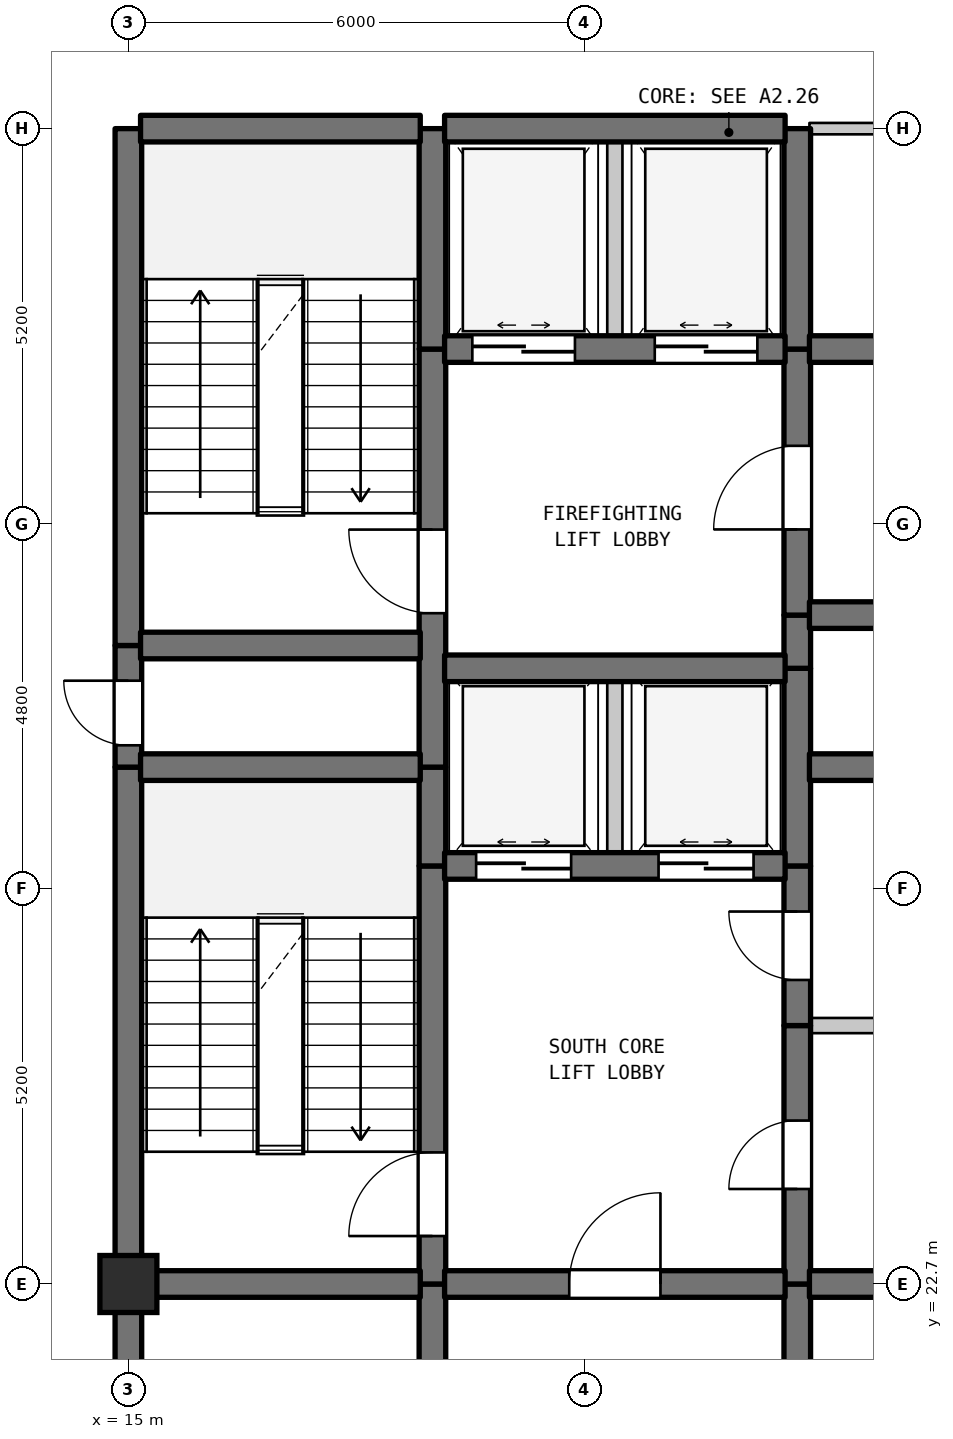
"""IFC4 building model, lengths in metres.
Left out: names, types, materials, properties, quantities, classifications, styles, units other than length and angle.
Written with IfcOpenShell. Run it as: python <this file> out.ifc"""

import sys

from ifc_helpers import new_model, si_unit, direction, frame, frame_2d, origin, origin_2d, place, context, subcontext, project, spatial, rectangle, extrude, element, fill, save


model = new_model("IFC4")
c1 = context("Model", 3, precision=1e-05, world=origin(), true_north=direction((0.0, 1.0)))
c2 = subcontext(c1, "Body", "Model", "MODEL_VIEW")
j1 = project(units=[si_unit("LENGTHUNIT", "METRE"), si_unit("PLANEANGLEUNIT", "RADIAN")], contexts=[c1])
p1 = place(None, origin())
s1 = spatial("IfcSite", under=j1, at=p1, CompositionType="ELEMENT")
p2 = place(p1, origin())
s2 = spatial("IfcBuilding", under=s1, at=p2, CompositionType="ELEMENT")
p3 = place(p2, frame((0.0, 0.0, 242.8)))
s3 = spatial("IfcBuildingStorey", under=s2, at=p3, CompositionType="ELEMENT", Elevation=242.8)
p4 = place(p3, frame((15.0, 22.7, 0.0), z_axis=(0.0, 0.0, 1.0), x_axis=(1.0, 0.0, 0.0)))
e1 = element("IfcColumn", 1, at=p4, inside=s3, PredefinedType="COLUMN", context=c2, shape_type="SweptSolid", body=[
    extrude(rectangle(XDim=0.75, YDim=0.75, at=origin_2d()), origin(), (0.0, 0.0, 1.0), 4.5),
])
p5 = place(p3, frame((15.0, 19.5, 0.0), z_axis=(0.0, 0.0, 1.0), x_axis=(0.0, 1.0, 0.0)))
e2 = element("IfcWall", 2, at=p5, inside=s3, PredefinedType="SHEAR", context=c2, shape_type="SweptSolid", body=[
    extrude(rectangle(XDim=3.2, YDim=0.35, at=frame_2d((1.6, 0.0))), origin(), (0.0, 0.0, 1.0), 4.19),
])
p6 = place(p3, frame((15.0, 22.7, 0.0), z_axis=(0.0, 0.0, 1.0), x_axis=(0.0, 1.0, 0.0)))
e3 = element("IfcWall", 3, at=p6, inside=s3, PredefinedType="SHEAR", context=c2, shape_type="SweptSolid", body=[
    extrude(rectangle(XDim=6.8, YDim=0.35, at=frame_2d((3.4, 0.0))), origin(), (0.0, 0.0, 1.0), 4.19),
])
p7 = place(p3, frame((15.0, 29.5, 0.0), z_axis=(0.0, 0.0, 1.0), x_axis=(0.0, 1.0, 0.0)))
e4 = element("IfcWall", 4, at=p7, inside=s3, PredefinedType="SHEAR", context=c2, shape_type="SweptSolid", body=[
    extrude(rectangle(XDim=1.6, YDim=0.35, at=frame_2d((0.8, 0.0))), origin(), (0.0, 0.0, 1.0), 4.19),
])
p8 = place(p7, frame((0.287, 0.0, 0.0)))
e5 = element("IfcOpeningElement", 5, at=p8, cuts=e4, PredefinedType="OPENING", context=c2, shape_type="SweptSolid", body=[
    extrude(rectangle(XDim=0.85, YDim=2.1, at=frame_2d((0.425, 1.05))), frame((0.0, 0.185, 0.0), z_axis=(0.0, -1.0, 0.0), x_axis=(1.0, 0.0, 0.0)), (0.0, 0.0, 1.0), 0.37),
])
p9 = place(p3, frame((15.0, 31.1, 0.0), z_axis=(0.0, 0.0, 1.0), x_axis=(0.0, 1.0, 0.0)))
e6 = element("IfcWall", 6, at=p9, inside=s3, PredefinedType="SHEAR", context=c2, shape_type="SweptSolid", body=[
    extrude(rectangle(XDim=6.8, YDim=0.35, at=frame_2d((3.4, 0.0))), origin(), (0.0, 0.0, 1.0), 4.19),
])
p10 = place(p3, frame((19.0, 19.5, 0.0), z_axis=(0.0, 0.0, 1.0), x_axis=(0.0, 1.0, 0.0)))
e7 = element("IfcWall", 7, at=p10, inside=s3, PredefinedType="SHEAR", context=c2, shape_type="SweptSolid", body=[
    extrude(rectangle(XDim=3.2, YDim=0.35, at=frame_2d((1.6, 0.0))), origin(), (0.0, 0.0, 1.0), 4.19),
])
p11 = place(p3, frame((19.0, 22.7, 0.0), z_axis=(0.0, 0.0, 1.0), x_axis=(0.0, 1.0, 0.0)))
e8 = element("IfcWall", 8, at=p11, inside=s3, PredefinedType="SHEAR", context=c2, shape_type="SweptSolid", body=[
    extrude(rectangle(XDim=5.5, YDim=0.35, at=frame_2d((2.75, 0.0))), origin(), (0.0, 0.0, 1.0), 4.19),
])
p12 = place(p11, frame((0.631, 0.0, 0.0)))
e9 = element("IfcOpeningElement", 9, at=p12, cuts=e8, PredefinedType="OPENING", context=c2, shape_type="SweptSolid", body=[
    extrude(rectangle(XDim=1.1, YDim=2.15, at=frame_2d((0.55, 1.075))), frame((0.0, 0.185, 0.0), z_axis=(0.0, -1.0, 0.0), x_axis=(1.0, 0.0, 0.0)), (0.0, 0.0, 1.0), 0.37),
])
p13 = place(p3, frame((19.0, 28.2, 0.0), z_axis=(0.0, 0.0, 1.0), x_axis=(0.0, 1.0, 0.0)))
e10 = element("IfcWall", 10, at=p13, inside=s3, PredefinedType="SHEAR", context=c2, shape_type="SweptSolid", body=[
    extrude(rectangle(XDim=1.3, YDim=0.35, at=frame_2d((0.65, 0.0))), origin(), (0.0, 0.0, 1.0), 4.19),
])
p14 = place(p3, frame((19.0, 29.5, 0.0), z_axis=(0.0, 0.0, 1.0), x_axis=(0.0, 1.0, 0.0)))
e11 = element("IfcWall", 11, at=p14, inside=s3, PredefinedType="SHEAR", context=c2, shape_type="SweptSolid", body=[
    extrude(rectangle(XDim=5.5, YDim=0.35, at=frame_2d((2.75, 0.0))), origin(), (0.0, 0.0, 1.0), 4.19),
])
p15 = place(p14, frame((2.025, 0.0, 0.0)))
e12 = element("IfcOpeningElement", 12, at=p15, cuts=e11, PredefinedType="OPENING", context=c2, shape_type="SweptSolid", body=[
    extrude(rectangle(XDim=1.1, YDim=2.15, at=frame_2d((0.55, 1.075))), frame((0.0, 0.185, 0.0), z_axis=(0.0, -1.0, 0.0), x_axis=(1.0, 0.0, 0.0)), (0.0, 0.0, 1.0), 0.37),
])
p16 = place(p3, frame((19.0, 35.0, 0.0), z_axis=(0.0, 0.0, 1.0), x_axis=(0.0, 1.0, 0.0)))
e13 = element("IfcWall", 13, at=p16, inside=s3, PredefinedType="SHEAR", context=c2, shape_type="SweptSolid", body=[
    extrude(rectangle(XDim=2.9, YDim=0.35, at=frame_2d((1.45, 0.0))), origin(), (0.0, 0.0, 1.0), 4.19),
])
p17 = place(p3, frame((21.4, 28.2, 0.0), z_axis=(0.0, 0.0, 1.0), x_axis=(0.0, 1.0, 0.0)))
e14 = element("IfcWall", 14, at=p17, inside=s3, PredefinedType="STANDARD", context=c2, shape_type="SweptSolid", body=[
    extrude(rectangle(XDim=2.6, YDim=0.2, at=frame_2d((1.3, 0.0))), origin(), (0.0, 0.0, 1.0), 4.19),
])
p18 = place(p3, frame((21.4, 35.0, 0.0), z_axis=(0.0, 0.0, 1.0), x_axis=(0.0, 1.0, 0.0)))
e15 = element("IfcWall", 15, at=p18, inside=s3, PredefinedType="STANDARD", context=c2, shape_type="SweptSolid", body=[
    extrude(rectangle(XDim=2.9, YDim=0.2, at=frame_2d((1.45, 0.0))), origin(), (0.0, 0.0, 1.0), 4.19),
])
p19 = place(p3, frame((23.8, 19.5, 0.0), z_axis=(0.0, 0.0, 1.0), x_axis=(0.0, 1.0, 0.0)))
e16 = element("IfcWall", 16, at=p19, inside=s3, PredefinedType="SHEAR", context=c2, shape_type="SweptSolid", body=[
    extrude(rectangle(XDim=3.2, YDim=0.35, at=frame_2d((1.6, 0.0))), origin(), (0.0, 0.0, 1.0), 4.19),
])
p20 = place(p3, frame((23.8, 22.7, 0.0), z_axis=(0.0, 0.0, 1.0), x_axis=(0.0, 1.0, 0.0)))
e17 = element("IfcWall", 17, at=p20, inside=s3, PredefinedType="SHEAR", context=c2, shape_type="SweptSolid", body=[
    extrude(rectangle(XDim=3.4, YDim=0.35, at=frame_2d((1.7, 0.0))), origin(), (0.0, 0.0, 1.0), 4.19),
])
p21 = place(p20, frame((1.25, 0.0, 0.0)))
e18 = element("IfcOpeningElement", 18, at=p21, cuts=e17, PredefinedType="OPENING", context=c2, shape_type="SweptSolid", body=[
    extrude(rectangle(XDim=0.9, YDim=2.15, at=frame_2d((0.45, 1.075))), frame((0.0, 0.185, 0.0), z_axis=(0.0, -1.0, 0.0), x_axis=(1.0, 0.0, 0.0)), (0.0, 0.0, 1.0), 0.37),
])
p22 = place(p3, frame((23.8, 26.1, 0.0), z_axis=(0.0, 0.0, 1.0), x_axis=(0.0, 1.0, 0.0)))
e19 = element("IfcWall", 19, at=p22, inside=s3, PredefinedType="SHEAR", context=c2, shape_type="SweptSolid", body=[
    extrude(rectangle(XDim=2.1, YDim=0.35, at=frame_2d((1.05, 0.0))), origin(), (0.0, 0.0, 1.0), 4.19),
])
p23 = place(p22, frame((0.6, 0.0, 0.0)))
e20 = element("IfcOpeningElement", 20, at=p23, cuts=e19, PredefinedType="OPENING", context=c2, shape_type="SweptSolid", body=[
    extrude(rectangle(XDim=0.9, YDim=2.15, at=frame_2d((0.45, 1.075))), frame((0.0, 0.185, 0.0), z_axis=(0.0, -1.0, 0.0), x_axis=(1.0, 0.0, 0.0)), (0.0, 0.0, 1.0), 0.37),
])
p24 = place(p3, frame((23.8, 28.2, 0.0), z_axis=(0.0, 0.0, 1.0), x_axis=(0.0, 1.0, 0.0)))
e21 = element("IfcWall", 21, at=p24, inside=s3, PredefinedType="SHEAR", context=c2, shape_type="SweptSolid", body=[
    extrude(rectangle(XDim=2.6, YDim=0.35, at=frame_2d((1.3, 0.0))), origin(), (0.0, 0.0, 1.0), 4.19),
])
p25 = place(p3, frame((23.8, 30.8, 0.0), z_axis=(0.0, 0.0, 1.0), x_axis=(0.0, 1.0, 0.0)))
e22 = element("IfcWall", 22, at=p25, inside=s3, PredefinedType="SHEAR", context=c2, shape_type="SweptSolid", body=[
    extrude(rectangle(XDim=0.7, YDim=0.35, at=frame_2d((0.35, 0.0))), origin(), (0.0, 0.0, 1.0), 4.19),
])
p26 = place(p3, frame((23.8, 31.5, 0.0), z_axis=(0.0, 0.0, 1.0), x_axis=(0.0, 1.0, 0.0)))
e23 = element("IfcWall", 23, at=p26, inside=s3, PredefinedType="SHEAR", context=c2, shape_type="SweptSolid", body=[
    extrude(rectangle(XDim=3.5, YDim=0.35, at=frame_2d((1.75, 0.0))), origin(), (0.0, 0.0, 1.0), 4.19),
])
p27 = place(p26, frame((1.127, 0.0, 0.0)))
e24 = element("IfcOpeningElement", 24, at=p27, cuts=e23, PredefinedType="OPENING", context=c2, shape_type="SweptSolid", body=[
    extrude(rectangle(XDim=1.1, YDim=2.15, at=frame_2d((0.55, 1.075))), frame((0.0, 0.185, 0.0), z_axis=(0.0, -1.0, 0.0), x_axis=(1.0, 0.0, 0.0)), (0.0, 0.0, 1.0), 0.37),
])
p28 = place(p3, frame((23.8, 35.0, 0.0), z_axis=(0.0, 0.0, 1.0), x_axis=(0.0, 1.0, 0.0)))
e25 = element("IfcWall", 25, at=p28, inside=s3, PredefinedType="SHEAR", context=c2, shape_type="SweptSolid", body=[
    extrude(rectangle(XDim=2.9, YDim=0.35, at=frame_2d((1.45, 0.0))), origin(), (0.0, 0.0, 1.0), 4.19),
])
p29 = place(p3, frame((15.16, 22.7, 0.0), z_axis=(0.0, 0.0, 1.0), x_axis=(1.0, 0.0, 0.0)))
e26 = element("IfcWall", 26, at=p29, inside=s3, PredefinedType="SHEAR", context=c2, shape_type="SweptSolid", body=[
    extrude(rectangle(XDim=3.68, YDim=0.35, at=frame_2d((1.84, 0.0))), origin(), (0.0, 0.0, 1.0), 4.19),
])
p30 = place(p3, frame((19.16, 22.7, 0.0), z_axis=(0.0, 0.0, 1.0), x_axis=(1.0, 0.0, 0.0)))
e27 = element("IfcWall", 27, at=p30, inside=s3, PredefinedType="SHEAR", context=c2, shape_type="SweptSolid", body=[
    extrude(rectangle(XDim=4.48, YDim=0.35, at=frame_2d((2.24, 0.0))), origin(), (0.0, 0.0, 1.0), 4.19),
])
p31 = place(p30, frame((1.64, 0.0, 0.0)))
e28 = element("IfcOpeningElement", 28, at=p31, cuts=e27, PredefinedType="OPENING", context=c2, shape_type="SweptSolid", body=[
    extrude(rectangle(XDim=1.2, YDim=2.2, at=frame_2d((0.6, 1.1))), frame((0.0, 0.185, 0.0), z_axis=(0.0, -1.0, 0.0), x_axis=(1.0, 0.0, 0.0)), (0.0, 0.0, 1.0), 0.37),
])
p32 = place(p3, frame((23.96, 22.7, 0.0), z_axis=(0.0, 0.0, 1.0), x_axis=(1.0, 0.0, 0.0)))
e29 = element("IfcWall", 29, at=p32, inside=s3, PredefinedType="SHEAR", context=c2, shape_type="SweptSolid", body=[
    extrude(rectangle(XDim=3.155, YDim=0.35, at=frame_2d((1.578, 0.0))), origin(), (0.0, 0.0, 1.0), 4.19),
])
p33 = place(p3, frame((23.96, 26.1, 0.0), z_axis=(0.0, 0.0, 1.0), x_axis=(1.0, 0.0, 0.0)))
e30 = element("IfcWall", 30, at=p33, inside=s3, PredefinedType="STANDARD", context=c2, shape_type="SweptSolid", body=[
    extrude(rectangle(XDim=3.18, YDim=0.2, at=frame_2d((1.59, 0.0))), origin(), (0.0, 0.0, 1.0), 4.19),
])
p34 = place(p3, frame((19.16, 28.2, 0.0), z_axis=(0.0, 0.0, 1.0), x_axis=(1.0, 0.0, 0.0)))
e31 = element("IfcWall", 31, at=p34, inside=s3, PredefinedType="SHEAR", context=c2, shape_type="SweptSolid", body=[
    extrude(rectangle(XDim=4.48, YDim=0.35, at=frame_2d((2.24, 0.0))), origin(), (0.0, 0.0, 1.0), 4.19),
])
p35 = place(p34, frame((0.415, 0.0, 0.0)))
e32 = element("IfcOpeningElement", 32, at=p35, cuts=e31, PredefinedType="OPENING", context=c2, shape_type="SweptSolid", body=[
    extrude(rectangle(XDim=1.25, YDim=2.2, at=frame_2d((0.625, 1.1))), frame((0.0, 0.185, 0.0), z_axis=(0.0, -1.0, 0.0), x_axis=(1.0, 0.0, 0.0)), (0.0, 0.0, 1.0), 0.37),
])
p36 = place(p34, frame((2.815, 0.0, 0.0)))
e33 = element("IfcOpeningElement", 33, at=p36, cuts=e31, PredefinedType="OPENING", context=c2, shape_type="SweptSolid", body=[
    extrude(rectangle(XDim=1.25, YDim=2.2, at=frame_2d((0.625, 1.1))), frame((0.0, 0.185, 0.0), z_axis=(0.0, -1.0, 0.0), x_axis=(1.0, 0.0, 0.0)), (0.0, 0.0, 1.0), 0.37),
])
p37 = place(p3, frame((15.16, 29.5, 0.0), z_axis=(0.0, 0.0, 1.0), x_axis=(1.0, 0.0, 0.0)))
e34 = element("IfcWall", 34, at=p37, inside=s3, PredefinedType="SHEAR", context=c2, shape_type="SweptSolid", body=[
    extrude(rectangle(XDim=3.68, YDim=0.35, at=frame_2d((1.84, 0.0))), origin(), (0.0, 0.0, 1.0), 4.19),
])
p38 = place(p3, frame((23.96, 29.5, 0.0), z_axis=(0.0, 0.0, 1.0), x_axis=(1.0, 0.0, 0.0)))
e35 = element("IfcWall", 35, at=p38, inside=s3, PredefinedType="SHEAR", context=c2, shape_type="SweptSolid", body=[
    extrude(rectangle(XDim=3.18, YDim=0.35, at=frame_2d((1.59, 0.0))), origin(), (0.0, 0.0, 1.0), 4.19),
])
p39 = place(p3, frame((19.16, 30.8, 0.0), z_axis=(0.0, 0.0, 1.0), x_axis=(1.0, 0.0, 0.0)))
e36 = element("IfcWall", 36, at=p39, inside=s3, PredefinedType="SHEAR", context=c2, shape_type="SweptSolid", body=[
    extrude(rectangle(XDim=4.48, YDim=0.35, at=frame_2d((2.24, 0.0))), origin(), (0.0, 0.0, 1.0), 4.19),
])
p40 = place(p3, frame((15.16, 31.1, 0.0), z_axis=(0.0, 0.0, 1.0), x_axis=(1.0, 0.0, 0.0)))
e37 = element("IfcWall", 37, at=p40, inside=s3, PredefinedType="SHEAR", context=c2, shape_type="SweptSolid", body=[
    extrude(rectangle(XDim=3.68, YDim=0.35, at=frame_2d((1.84, 0.0))), origin(), (0.0, 0.0, 1.0), 4.19),
])
p41 = place(p3, frame((23.96, 31.5, 0.0), z_axis=(0.0, 0.0, 1.0), x_axis=(1.0, 0.0, 0.0)))
e38 = element("IfcWall", 38, at=p41, inside=s3, PredefinedType="SHEAR", context=c2, shape_type="SweptSolid", body=[
    extrude(rectangle(XDim=3.18, YDim=0.35, at=frame_2d((1.59, 0.0))), origin(), (0.0, 0.0, 1.0), 4.19),
])
p42 = place(p41, frame((1.094, 0.0, 0.0)))
e39 = element("IfcOpeningElement", 39, at=p42, cuts=e38, PredefinedType="OPENING", context=c2, shape_type="SweptSolid", body=[
    extrude(rectangle(XDim=0.85, YDim=2.1, at=frame_2d((0.425, 1.05))), frame((0.0, 0.185, 0.0), z_axis=(0.0, -1.0, 0.0), x_axis=(1.0, 0.0, 0.0)), (0.0, 0.0, 1.0), 0.37),
])
p43 = place(p3, frame((19.16, 35.0, 0.0), z_axis=(0.0, 0.0, 1.0), x_axis=(1.0, 0.0, 0.0)))
e40 = element("IfcWall", 40, at=p43, inside=s3, PredefinedType="SHEAR", context=c2, shape_type="SweptSolid", body=[
    extrude(rectangle(XDim=4.48, YDim=0.35, at=frame_2d((2.24, 0.0))), origin(), (0.0, 0.0, 1.0), 4.19),
])
p44 = place(p43, frame((0.365, 0.0, 0.0)))
e41 = element("IfcOpeningElement", 41, at=p44, cuts=e40, PredefinedType="OPENING", context=c2, shape_type="SweptSolid", body=[
    extrude(rectangle(XDim=1.35, YDim=2.2, at=frame_2d((0.675, 1.1))), frame((0.0, 0.185, 0.0), z_axis=(0.0, -1.0, 0.0), x_axis=(1.0, 0.0, 0.0)), (0.0, 0.0, 1.0), 0.37),
])
p45 = place(p43, frame((2.765, 0.0, 0.0)))
e42 = element("IfcOpeningElement", 42, at=p45, cuts=e40, PredefinedType="OPENING", context=c2, shape_type="SweptSolid", body=[
    extrude(rectangle(XDim=1.35, YDim=2.2, at=frame_2d((0.675, 1.1))), frame((0.0, 0.185, 0.0), z_axis=(0.0, -1.0, 0.0), x_axis=(1.0, 0.0, 0.0)), (0.0, 0.0, 1.0), 0.37),
])
p46 = place(p3, frame((23.96, 35.0, 0.0), z_axis=(0.0, 0.0, 1.0), x_axis=(1.0, 0.0, 0.0)))
e43 = element("IfcWall", 43, at=p46, inside=s3, PredefinedType="SHEAR", context=c2, shape_type="SweptSolid", body=[
    extrude(rectangle(XDim=3.995, YDim=0.35, at=frame_2d((1.998, 0.0))), origin(), (0.0, 0.0, 1.0), 4.19),
])
p47 = place(p46, frame((1.393, 0.0, 0.0)))
e44 = element("IfcOpeningElement", 44, at=p47, cuts=e43, PredefinedType="OPENING", context=c2, shape_type="SweptSolid", body=[
    extrude(rectangle(XDim=0.95, YDim=2.15, at=frame_2d((0.475, 1.075))), frame((0.0, 0.185, 0.0), z_axis=(0.0, -1.0, 0.0), x_axis=(1.0, 0.0, 0.0)), (0.0, 0.0, 1.0), 0.37),
])
p48 = place(p3, frame((15.16, 37.9, 0.0), z_axis=(0.0, 0.0, 1.0), x_axis=(1.0, 0.0, 0.0)))
e45 = element("IfcWall", 45, at=p48, inside=s3, PredefinedType="SHEAR", context=c2, shape_type="SweptSolid", body=[
    extrude(rectangle(XDim=3.68, YDim=0.35, at=frame_2d((1.84, 0.0))), origin(), (0.0, 0.0, 1.0), 4.19),
])
p49 = place(p3, frame((19.16, 37.9, 0.0), z_axis=(0.0, 0.0, 1.0), x_axis=(1.0, 0.0, 0.0)))
e46 = element("IfcWall", 46, at=p49, inside=s3, PredefinedType="SHEAR", context=c2, shape_type="SweptSolid", body=[
    extrude(rectangle(XDim=4.48, YDim=0.35, at=frame_2d((2.24, 0.0))), origin(), (0.0, 0.0, 1.0), 4.19),
])
p50 = place(p3, frame((23.96, 37.9, 0.0), z_axis=(0.0, 0.0, 1.0), x_axis=(1.0, 0.0, 0.0)))
e47 = element("IfcWall", 47, at=p50, inside=s3, PredefinedType="STANDARD", context=c2, shape_type="SweptSolid", body=[
    extrude(rectangle(XDim=3.995, YDim=0.15, at=frame_2d((1.998, 0.0))), origin(), (0.0, 0.0, 1.0), 3.69),
])
p51 = place(p8, origin())
e48 = element("IfcDoor", 48, at=p51, inside=s3, OperationType="SINGLE_SWING_RIGHT", PredefinedType="DOOR", context=c2, shape_type="SweptSolid", body=[
    extrude(rectangle(XDim=0.85, YDim=2.1, at=frame_2d((0.425, 1.05))), frame((0.0, 0.025, 0.0), z_axis=(0.0, -1.0, 0.0), x_axis=(1.0, 0.0, 0.0)), (0.0, 0.0, 1.0), 0.05),
])
fill(e5, e48)
p52 = place(p12, origin())
e49 = element("IfcDoor", 49, at=p52, inside=s3, OperationType="SINGLE_SWING_LEFT", PredefinedType="DOOR", context=c2, shape_type="SweptSolid", body=[
    extrude(rectangle(XDim=1.1, YDim=2.15, at=frame_2d((0.55, 1.075))), frame((0.0, 0.025, 0.0), z_axis=(0.0, -1.0, 0.0), x_axis=(1.0, 0.0, 0.0)), (0.0, 0.0, 1.0), 0.05),
])
fill(e9, e49)
p53 = place(p15, origin())
e50 = element("IfcDoor", 50, at=p53, inside=s3, OperationType="SINGLE_SWING_RIGHT", PredefinedType="DOOR", context=c2, shape_type="SweptSolid", body=[
    extrude(rectangle(XDim=1.1, YDim=2.15, at=frame_2d((0.55, 1.075))), frame((0.0, 0.025, 0.0), z_axis=(0.0, -1.0, 0.0), x_axis=(1.0, 0.0, 0.0)), (0.0, 0.0, 1.0), 0.05),
])
fill(e12, e50)
p54 = place(p21, origin())
e51 = element("IfcDoor", 51, at=p54, inside=s3, OperationType="SINGLE_SWING_LEFT", PredefinedType="DOOR", context=c2, shape_type="SweptSolid", body=[
    extrude(rectangle(XDim=0.9, YDim=2.15, at=frame_2d((0.45, 1.075))), frame((0.0, 0.025, 0.0), z_axis=(0.0, -1.0, 0.0), x_axis=(1.0, 0.0, 0.0)), (0.0, 0.0, 1.0), 0.05),
])
fill(e18, e51)
p55 = place(p23, origin())
e52 = element("IfcDoor", 52, at=p55, inside=s3, OperationType="SINGLE_SWING_RIGHT", PredefinedType="DOOR", context=c2, shape_type="SweptSolid", body=[
    extrude(rectangle(XDim=0.9, YDim=2.15, at=frame_2d((0.45, 1.075))), frame((0.0, 0.025, 0.0), z_axis=(0.0, -1.0, 0.0), x_axis=(1.0, 0.0, 0.0)), (0.0, 0.0, 1.0), 0.05),
])
fill(e20, e52)
p56 = place(p27, origin())
e53 = element("IfcDoor", 53, at=p56, inside=s3, OperationType="SINGLE_SWING_LEFT", PredefinedType="DOOR", context=c2, shape_type="SweptSolid", body=[
    extrude(rectangle(XDim=1.1, YDim=2.15, at=frame_2d((0.55, 1.075))), frame((0.0, 0.025, 0.0), z_axis=(0.0, -1.0, 0.0), x_axis=(1.0, 0.0, 0.0)), (0.0, 0.0, 1.0), 0.05),
])
fill(e24, e53)
p57 = place(p31, origin())
e54 = element("IfcDoor", 54, at=p57, inside=s3, OperationType="SINGLE_SWING_RIGHT", PredefinedType="DOOR", context=c2, shape_type="SweptSolid", body=[
    extrude(rectangle(XDim=1.2, YDim=2.2, at=frame_2d((0.6, 1.1))), frame((0.0, 0.025, 0.0), z_axis=(0.0, -1.0, 0.0), x_axis=(1.0, 0.0, 0.0)), (0.0, 0.0, 1.0), 0.05),
])
fill(e28, e54)
p58 = place(p35, origin())
e55 = element("IfcDoor", 55, at=p58, inside=s3, OperationType="DOUBLE_DOOR_SLIDING", PredefinedType="DOOR", context=c2, shape_type="SweptSolid", body=[
    extrude(rectangle(XDim=1.25, YDim=2.2, at=frame_2d((0.625, 1.1))), frame((0.0, 0.025, 0.0), z_axis=(0.0, -1.0, 0.0), x_axis=(1.0, 0.0, 0.0)), (0.0, 0.0, 1.0), 0.05),
])
fill(e32, e55)
p59 = place(p36, origin())
e56 = element("IfcDoor", 56, at=p59, inside=s3, OperationType="DOUBLE_DOOR_SLIDING", PredefinedType="DOOR", context=c2, shape_type="SweptSolid", body=[
    extrude(rectangle(XDim=1.25, YDim=2.2, at=frame_2d((0.625, 1.1))), frame((0.0, 0.025, 0.0), z_axis=(0.0, -1.0, 0.0), x_axis=(1.0, 0.0, 0.0)), (0.0, 0.0, 1.0), 0.05),
])
fill(e33, e56)
p60 = place(p44, origin())
e57 = element("IfcDoor", 57, at=p60, inside=s3, OperationType="DOUBLE_DOOR_SLIDING", PredefinedType="DOOR", context=c2, shape_type="SweptSolid", body=[
    extrude(rectangle(XDim=1.35, YDim=2.2, at=frame_2d((0.675, 1.1))), frame((0.0, 0.025, 0.0), z_axis=(0.0, -1.0, 0.0), x_axis=(1.0, 0.0, 0.0)), (0.0, 0.0, 1.0), 0.05),
])
fill(e41, e57)
p61 = place(p45, origin())
e58 = element("IfcDoor", 58, at=p61, inside=s3, OperationType="DOUBLE_DOOR_SLIDING", PredefinedType="DOOR", context=c2, shape_type="SweptSolid", body=[
    extrude(rectangle(XDim=1.35, YDim=2.2, at=frame_2d((0.675, 1.1))), frame((0.0, 0.025, 0.0), z_axis=(0.0, -1.0, 0.0), x_axis=(1.0, 0.0, 0.0)), (0.0, 0.0, 1.0), 0.05),
])
fill(e42, e58)
save(model, sys.argv[1])
